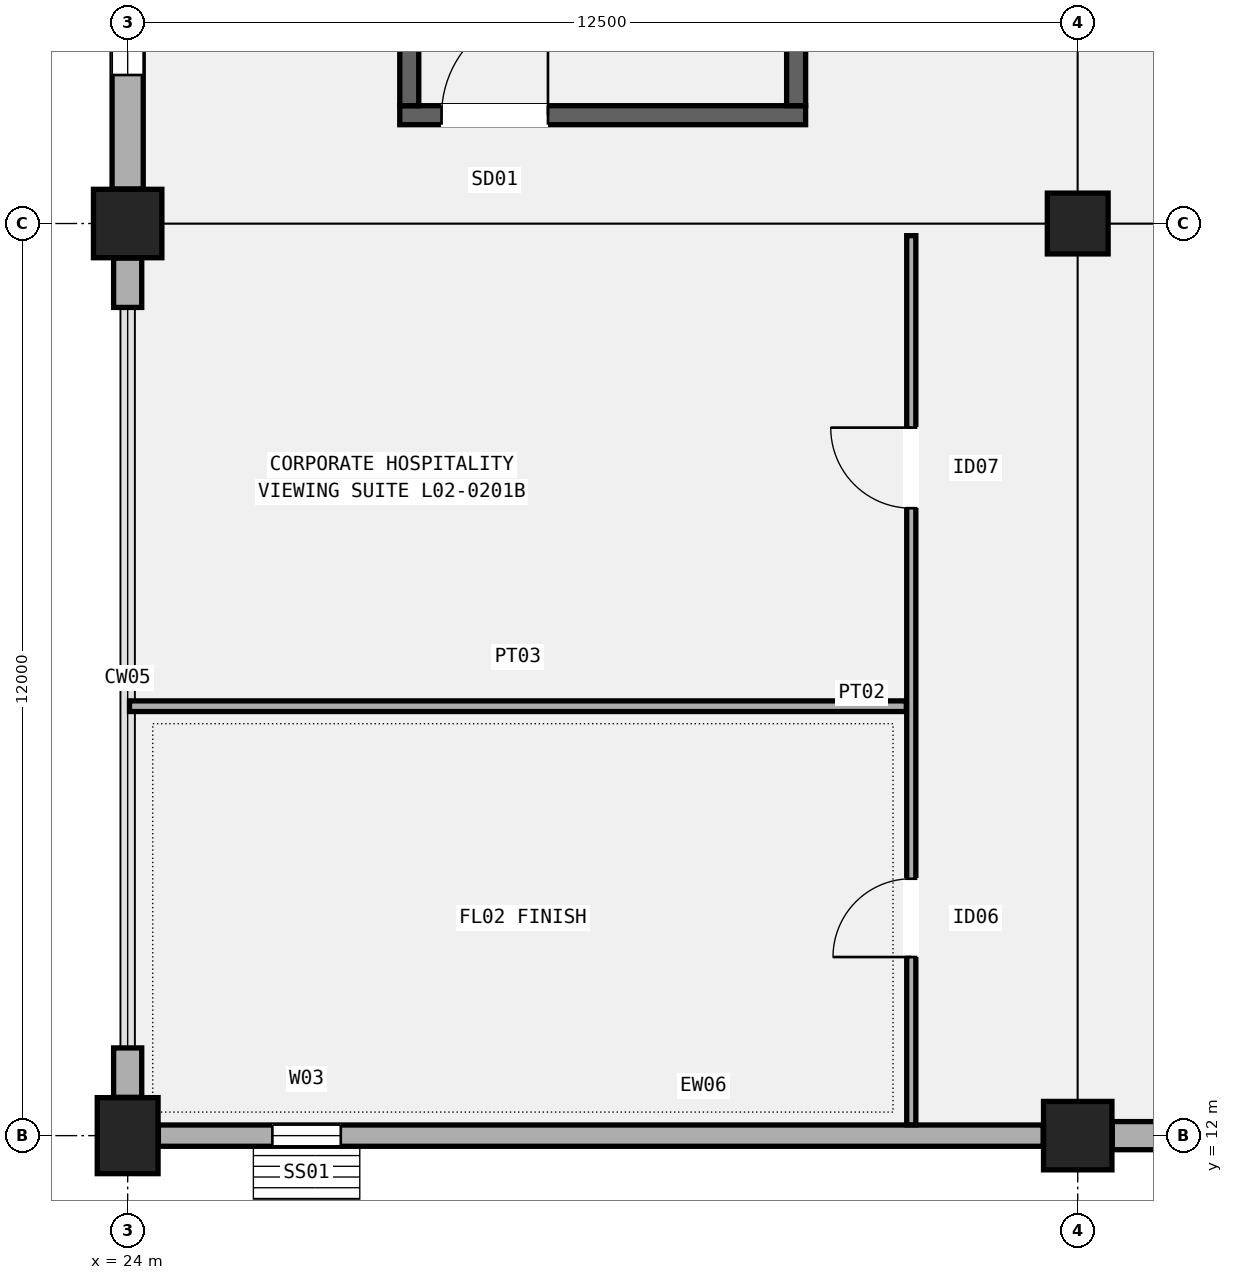
"""IFC4 building model, lengths in metres.
Left out: names, types, materials, properties, quantities, classifications, styles, units other than length and angle.
Written with IfcOpenShell. Run it as: python <this file> out.ifc"""

import sys

from ifc_helpers import new_model, si_unit, direction, frame, frame_2d, origin, origin_2d, place, context, subcontext, project, spatial, rectangle, extrude, element, fill, save


model = new_model("IFC4")
c1 = context("Model", 3, precision=1e-05, world=origin(), true_north=direction((0.0, 1.0)))
c2 = subcontext(c1, "Body", "Model", "MODEL_VIEW")
j1 = project(units=[si_unit("LENGTHUNIT", "METRE"), si_unit("PLANEANGLEUNIT", "RADIAN")], contexts=[c1])
p1 = place(None, origin())
s1 = spatial("IfcSite", under=j1, at=p1, CompositionType="ELEMENT")
p2 = place(p1, origin())
s2 = spatial("IfcBuilding", under=s1, at=p2, CompositionType="ELEMENT")
p3 = place(p2, frame((0.0, 0.0, 10.2)))
s3 = spatial("IfcBuildingStorey", under=s2, at=p3, CompositionType="ELEMENT", Elevation=10.2)
p4 = place(p3, frame((24.0, 12.0, 0.0), z_axis=(0.0, 0.0, 1.0), x_axis=(1.0, 0.0, 0.0)))
e1 = element("IfcColumn", 1, at=p4, inside=s3, PredefinedType="COLUMN", context=c2, shape_type="SweptSolid", body=[
    extrude(rectangle(XDim=0.8, YDim=1.0, at=origin_2d()), origin(), (0.0, 0.0, 1.0), 5.1),
])
for number, where, z_axis, x_axis in (
    (2, (24.0, 24.0, 0.0), (0.0, 0.0, 1.0), (1.0, 0.0, 0.0)),
    (3, (36.5, 12.0, 0.0), (0.0, 0.0, 1.0), (1.0, 0.0, 0.0)),
):
    element("IfcColumn", number, at=place(p3, frame(where, z_axis=z_axis, x_axis=x_axis)), inside=s3, PredefinedType="COLUMN", context=c2, shape_type="SweptSolid", body=[
        extrude(rectangle(XDim=0.9, YDim=0.9, at=origin_2d()), origin(), (0.0, 0.0, 1.0), 5.1),
    ])
p5 = place(p3, frame((36.5, 24.0, 0.0), z_axis=(0.0, 0.0, 1.0), x_axis=(1.0, 0.0, 0.0)))
e4 = element("IfcColumn", 4, at=p5, inside=s3, PredefinedType="COLUMN", context=c2, shape_type="SweptSolid", body=[
    extrude(rectangle(XDim=0.8, YDim=0.8, at=origin_2d()), origin(), (0.0, 0.0, 1.0), 5.1),
])
p6 = place(p3, frame((24.404, 12.0, 0.0), z_axis=(0.0, 0.0, 1.0), x_axis=(1.0, 0.0, 0.0)))
e5 = element("IfcWall", 5, at=p6, inside=s3, PredefinedType="SOLIDWALL", context=c2, shape_type="SweptSolid", body=[
    extrude(rectangle(XDim=11.642, YDim=0.28, at=frame_2d((5.821, 0.0))), origin(), (0.0, 0.0, 1.0), 4.02),
])
p7 = place(p6, frame((1.5, 0.0, 0.95)))
e6 = element("IfcOpeningElement", 6, at=p7, cuts=e5, PredefinedType="OPENING", context=c2, shape_type="SweptSolid", body=[
    extrude(rectangle(XDim=0.9, YDim=2.7, at=frame_2d((0.45, 1.35))), frame((0.0, 0.15, 0.0), z_axis=(0.0, -1.0, 0.0), x_axis=(1.0, 0.0, 0.0)), (0.0, 0.0, 1.0), 0.3),
])
p8 = place(p3, frame((24.0, 12.504, 0.0), z_axis=(0.0, 0.0, 1.0), x_axis=(0.0, 1.0, 0.0)))
e7 = element("IfcWall", 7, at=p8, inside=s3, PredefinedType="SOLIDWALL", context=c2, shape_type="SweptSolid", body=[
    extrude(rectangle(XDim=0.65, YDim=0.37, at=frame_2d((0.325, 0.0))), origin(), (0.0, 0.0, 1.0), 4.02),
])
p9 = place(p3, frame((24.0, 22.896, 0.0), z_axis=(0.0, 0.0, 1.0), x_axis=(0.0, 1.0, 0.0)))
e8 = element("IfcWall", 8, at=p9, inside=s3, PredefinedType="SOLIDWALL", context=c2, shape_type="SweptSolid", body=[
    extrude(rectangle(XDim=0.65, YDim=0.37, at=frame_2d((0.325, 0.0))), origin(), (0.0, 0.0, 1.0), 4.02),
])
p10 = place(p3, frame((24.0, 24.454, 0.0), z_axis=(0.0, 0.0, 1.0), x_axis=(0.0, 1.0, 0.0)))
e9 = element("IfcWall", 9, at=p10, inside=s3, PredefinedType="SOLIDWALL", context=c2, shape_type="SweptSolid", body=[
    extrude(rectangle(XDim=11.142, YDim=0.41, at=frame_2d((5.571, 0.0))), origin(), (0.0, 0.0, 1.0), 4.12),
])
p11 = place(p10, frame((1.5, 0.0, 0.95)))
e10 = element("IfcOpeningElement", 10, at=p11, cuts=e9, PredefinedType="OPENING", context=c2, shape_type="SweptSolid", body=[
    extrude(rectangle(XDim=1.05, YDim=2.2, at=frame_2d((0.525, 1.1))), frame((0.0, 0.215, 0.0), z_axis=(0.0, -1.0, 0.0), x_axis=(1.0, 0.0, 0.0)), (0.0, 0.0, 1.0), 0.43),
])
p12 = place(p3, frame((36.954, 12.0, 0.0), z_axis=(0.0, 0.0, 1.0), x_axis=(1.0, 0.0, 0.0)))
e11 = element("IfcWall", 11, at=p12, inside=s3, PredefinedType="SOLIDWALL", context=c2, shape_type="SweptSolid", body=[
    extrude(rectangle(XDim=0.65, YDim=0.37, at=frame_2d((0.325, 0.0))), origin(), (0.0, 0.0, 1.0), 4.12),
])
p13 = place(p3, frame((27.58, 25.425, 0.0), z_axis=(0.0, 0.0, 1.0), x_axis=(1.0, 0.0, 0.0)))
e12 = element("IfcWall", 12, at=p13, inside=s3, PredefinedType="SHEAR", context=c2, shape_type="SweptSolid", body=[
    extrude(rectangle(XDim=5.34, YDim=0.25, at=frame_2d((2.67, 0.0))), origin(), (0.0, 0.0, 1.0), 4.82),
])
p14 = place(p13, frame((0.55, 0.0, 0.0)))
e13 = element("IfcOpeningElement", 13, at=p14, cuts=e12, PredefinedType="OPENING", context=c2, shape_type="SweptSolid", body=[
    extrude(rectangle(XDim=1.4, YDim=2.15, at=frame_2d((0.7, 1.075))), frame((0.0, 0.135, 0.0), z_axis=(0.0, -1.0, 0.0), x_axis=(1.0, 0.0, 0.0)), (0.0, 0.0, 1.0), 0.27),
])
for number, where, z_axis, x_axis in (
    (14, (27.705, 25.55, 0.0), (0.0, 0.0, 1.0), (0.0, 1.0, 0.0)),
    (15, (32.795, 25.55, 0.0), (0.0, 0.0, 1.0), (0.0, 1.0, 0.0)),
):
    element("IfcWall", number, at=place(p3, frame(where, z_axis=z_axis, x_axis=x_axis)), inside=s3, PredefinedType="SHEAR", context=c2, shape_type="SweptSolid", body=[
        extrude(rectangle(XDim=8.9, YDim=0.25, at=frame_2d((4.45, 0.0))), origin(), (0.0, 0.0, 1.0), 4.82),
    ])
p15 = place(p3, frame((34.31, 12.142, 0.0), z_axis=(0.0, 0.0, 1.0), x_axis=(0.0, 1.0, 0.0)))
e16 = element("IfcWall", 16, at=p15, inside=s3, PredefinedType="PARTITIONING", context=c2, shape_type="SweptSolid", body=[
    extrude(rectangle(XDim=11.698, YDim=0.12, at=frame_2d((5.849, 0.0))), origin(), (0.0, 0.0, 1.0), 4.22),
])
p16 = place(p15, frame((2.208, 0.0, 0.0)))
e17 = element("IfcOpeningElement", 17, at=p16, cuts=e16, PredefinedType="OPENING", context=c2, shape_type="SweptSolid", body=[
    extrude(rectangle(XDim=1.03, YDim=2.12, at=frame_2d((0.515, 1.06))), frame((0.0, 0.07, 0.0), z_axis=(0.0, -1.0, 0.0), x_axis=(1.0, 0.0, 0.0)), (0.0, 0.0, 1.0), 0.14),
])
p17 = place(p15, frame((8.113, 0.0, 0.0)))
e18 = element("IfcOpeningElement", 18, at=p17, cuts=e16, PredefinedType="OPENING", context=c2, shape_type="SweptSolid", body=[
    extrude(rectangle(XDim=1.06, YDim=2.15, at=frame_2d((0.53, 1.075))), frame((0.0, 0.07, 0.0), z_axis=(0.0, -1.0, 0.0), x_axis=(1.0, 0.0, 0.0)), (0.0, 0.0, 1.0), 0.14),
])
p18 = place(p3, frame((24.024, 17.65, 0.0), z_axis=(0.0, 0.0, 1.0), x_axis=(1.0, 0.0, 0.0)))
e19 = element("IfcWall", 19, at=p18, inside=s3, PredefinedType="PARTITIONING", context=c2, shape_type="SweptSolid", body=[
    extrude(rectangle(XDim=10.221, YDim=0.14, at=frame_2d((5.111, 0.0))), origin(), (0.0, 0.0, 1.0), 4.22),
])
p19 = place(p7, origin())
e20 = element("IfcWindow", 20, at=p19, inside=s3, PartitioningType="SINGLE_PANEL", PredefinedType="WINDOW", context=c2, shape_type="SweptSolid", body=[
    extrude(rectangle(XDim=0.9, YDim=2.7, at=frame_2d((0.45, 1.35))), frame((0.0, 0.03, 0.0), z_axis=(0.0, -1.0, 0.0), x_axis=(1.0, 0.0, 0.0)), (0.0, 0.0, 1.0), 0.06),
])
fill(e6, e20)
p20 = place(p11, origin())
e21 = element("IfcWindow", 21, at=p20, inside=s3, PartitioningType="SINGLE_PANEL", PredefinedType="WINDOW", context=c2, shape_type="SweptSolid", body=[
    extrude(rectangle(XDim=1.05, YDim=2.2, at=frame_2d((0.525, 1.1))), frame((0.0, 0.03, 0.0), z_axis=(0.0, -1.0, 0.0), x_axis=(1.0, 0.0, 0.0)), (0.0, 0.0, 1.0), 0.06),
])
fill(e10, e21)
p21 = place(p14, origin())
e22 = element("IfcDoor", 22, at=p21, inside=s3, OperationType="SINGLE_SWING_RIGHT", PredefinedType="DOOR", context=c2, shape_type="SweptSolid", body=[
    extrude(rectangle(XDim=1.4, YDim=2.15, at=frame_2d((0.7, 1.075))), frame((0.0, 0.025, 0.0), z_axis=(0.0, -1.0, 0.0), x_axis=(1.0, 0.0, 0.0)), (0.0, 0.0, 1.0), 0.05),
])
fill(e13, e22)
p22 = place(p16, origin())
e23 = element("IfcDoor", 23, at=p22, inside=s3, OperationType="SINGLE_SWING_LEFT", PredefinedType="DOOR", context=c2, shape_type="SweptSolid", body=[
    extrude(rectangle(XDim=1.03, YDim=2.12, at=frame_2d((0.515, 1.06))), frame((0.0, 0.025, 0.0), z_axis=(0.0, -1.0, 0.0), x_axis=(1.0, 0.0, 0.0)), (0.0, 0.0, 1.0), 0.05),
])
fill(e17, e23)
p23 = place(p17, origin())
e24 = element("IfcDoor", 24, at=p23, inside=s3, OperationType="SINGLE_SWING_RIGHT", PredefinedType="DOOR", context=c2, shape_type="SweptSolid", body=[
    extrude(rectangle(XDim=1.06, YDim=2.15, at=frame_2d((0.53, 1.075))), frame((0.0, 0.025, 0.0), z_axis=(0.0, -1.0, 0.0), x_axis=(1.0, 0.0, 0.0)), (0.0, 0.0, 1.0), 0.05),
])
fill(e18, e24)
save(model, sys.argv[1])
